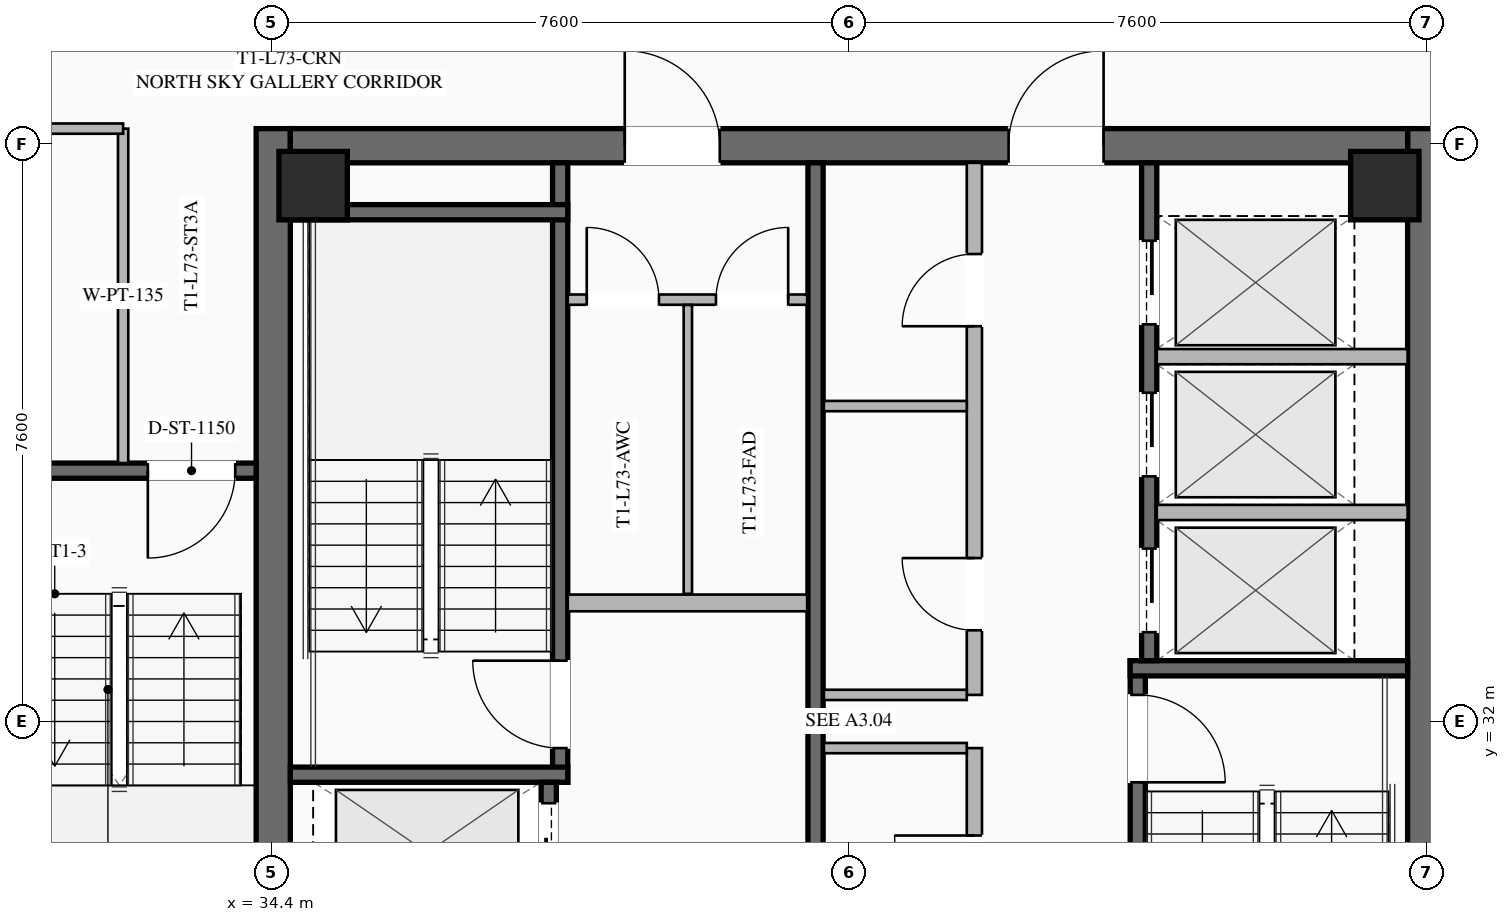
"""IFC4 building model, lengths in metres.
Left out: names, types, materials, properties, quantities, classifications, styles, units other than length and angle.
Written with IfcOpenShell. Run it as: python <this file> out.ifc"""

import sys

from ifc_helpers import new_model, si_unit, direction, frame, frame_2d, origin, origin_2d, place, context, subcontext, project, spatial, rectangle, hollow_rectangle, extrude, element, fill, save


model = new_model("IFC4")
c1 = context("Model", 3, precision=1e-05, world=origin(), true_north=direction((0.0, 1.0)))
c2 = subcontext(c1, "Body", "Model", "MODEL_VIEW")
j1 = project(units=[si_unit("LENGTHUNIT", "METRE"), si_unit("PLANEANGLEUNIT", "RADIAN")], contexts=[c1])
p1 = place(None, origin())
s1 = spatial("IfcSite", under=j1, at=p1, CompositionType="ELEMENT")
p2 = place(p1, origin())
s2 = spatial("IfcBuilding", under=s1, at=p2, CompositionType="ELEMENT")
p3 = place(p2, frame((0.0, 0.0, 270.5)))
s3 = spatial("IfcBuildingStorey", under=s2, at=p3, CompositionType="ELEMENT", Elevation=270.5)
for number, where, z_axis, x_axis in (
    (1, (34.425, 24.2, 0.0), (0.0, 0.0, 1.0), (0.0, 1.0, 0.0)),
    (2, (49.575, 39.8, 0.0), (0.0, 0.0, 1.0), (0.0, -1.0, 0.0)),
):
    element("IfcWall", number, at=place(p3, frame(where, z_axis=z_axis, x_axis=x_axis)), inside=s3, PredefinedType="SHEAR", context=c2, shape_type="SweptSolid", body=[
        extrude(rectangle(XDim=15.6, YDim=0.45, at=frame_2d((7.8, 0.0))), origin(), (0.0, 0.0, 1.0), 3.55),
    ])
p4 = place(p3, frame((34.65, 39.575, 0.0), z_axis=(0.0, 0.0, 1.0), x_axis=(1.0, 0.0, 0.0)))
e3 = element("IfcWall", 3, at=p4, inside=s3, PredefinedType="SHEAR", context=c2, shape_type="SweptSolid", body=[
    extrude(rectangle(XDim=14.7, YDim=0.45, at=frame_2d((7.35, 0.0))), origin(), (0.0, 0.0, 1.0), 3.55),
])
p5 = place(p4, frame((4.4, 0.0, 0.0)))
e4 = element("IfcOpeningElement", 4, at=p5, cuts=e3, PredefinedType="OPENING", context=c2, shape_type="SweptSolid", body=[
    extrude(rectangle(XDim=1.25, YDim=2.25, at=frame_2d((0.625, 1.125))), frame((0.0, 0.235, 0.0), z_axis=(0.0, -1.0, 0.0), x_axis=(1.0, 0.0, 0.0)), (0.0, 0.0, 1.0), 0.47),
])
p6 = place(p4, frame((9.45, 0.0, 0.0)))
e5 = element("IfcOpeningElement", 5, at=p6, cuts=e3, PredefinedType="OPENING", context=c2, shape_type="SweptSolid", body=[
    extrude(rectangle(XDim=1.25, YDim=2.25, at=frame_2d((0.625, 1.125))), frame((0.0, 0.235, 0.0), z_axis=(0.0, -1.0, 0.0), x_axis=(1.0, 0.0, 0.0)), (0.0, 0.0, 1.0), 0.47),
])
for number, where, z_axis, x_axis in (
    (6, (49.05, 39.05, 0.0), (0.0, 0.0, 1.0), (1.0, 0.0, 0.0)),
    (7, (34.95, 39.05, 0.0), (0.0, 0.0, 1.0), (1.0, 0.0, 0.0)),
):
    element("IfcColumn", number, at=place(p3, frame(where, z_axis=z_axis, x_axis=x_axis)), inside=s3, PredefinedType="COLUMN", context=c2, shape_type="SweptSolid", body=[
        extrude(hollow_rectangle(XDim=0.9, YDim=0.9, WallThickness=0.04, at=origin_2d()), origin(), (0.0, 0.0, 1.0), 3.37),
    ])
p7 = place(p3, frame((38.2, 31.2, 0.0), z_axis=(0.0, 0.0, 1.0), x_axis=(0.0, 1.0, 0.0)))
e8 = element("IfcWall", 8, at=p7, inside=s3, PredefinedType="SHEAR", context=c2, shape_type="SweptSolid", body=[
    extrude(rectangle(XDim=8.15, YDim=0.2, at=frame_2d((4.075, 0.0))), origin(), (0.0, 0.0, 1.0), 3.37),
])
p8 = place(p7, frame((0.45, 0.0, 0.0)))
e9 = element("IfcOpeningElement", 9, at=p8, cuts=e8, PredefinedType="OPENING", context=c2, shape_type="SweptSolid", body=[
    extrude(rectangle(XDim=1.15, YDim=2.2, at=frame_2d((0.575, 1.1))), frame((0.0, 0.11, 0.0), z_axis=(0.0, -1.0, 0.0), x_axis=(1.0, 0.0, 0.0)), (0.0, 0.0, 1.0), 0.22),
])
for number, where, z_axis, x_axis in (
    (10, (34.65, 31.3, 0.0), (0.0, 0.0, 1.0), (1.0, 0.0, 0.0)),
    (11, (34.65, 38.7, 0.0), (0.0, 0.0, 1.0), (1.0, 0.0, 0.0)),
):
    element("IfcWall", number, at=place(p3, frame(where, z_axis=z_axis, x_axis=x_axis)), inside=s3, PredefinedType="SHEAR", context=c2, shape_type="SweptSolid", body=[
        extrude(rectangle(XDim=3.65, YDim=0.2, at=frame_2d((1.825, 0.0))), origin(), (0.0, 0.0, 1.0), 3.37),
    ])
p9 = place(p3, frame((45.8, 32.8, 0.0), z_axis=(0.0, 0.0, 1.0), x_axis=(0.0, -1.0, 0.0)))
e12 = element("IfcWall", 12, at=p9, inside=s3, PredefinedType="SHEAR", context=c2, shape_type="SweptSolid", body=[
    extrude(rectangle(XDim=8.15, YDim=0.2, at=frame_2d((4.075, 0.0))), origin(), (0.0, 0.0, 1.0), 3.37),
])
p10 = place(p9, frame((0.45, 0.0, 0.0)))
e13 = element("IfcOpeningElement", 13, at=p10, cuts=e12, PredefinedType="OPENING", context=c2, shape_type="SweptSolid", body=[
    extrude(rectangle(XDim=1.15, YDim=2.2, at=frame_2d((0.575, 1.1))), frame((0.0, 0.11, 0.0), z_axis=(0.0, -1.0, 0.0), x_axis=(1.0, 0.0, 0.0)), (0.0, 0.0, 1.0), 0.22),
])
p11 = place(p3, frame((45.7, 32.7, 0.0), z_axis=(0.0, 0.0, 1.0), x_axis=(1.0, 0.0, 0.0)))
e14 = element("IfcWall", 14, at=p11, inside=s3, PredefinedType="SHEAR", context=c2, shape_type="SweptSolid", body=[
    extrude(rectangle(XDim=3.65, YDim=0.2, at=frame_2d((1.825, 0.0))), origin(), (0.0, 0.0, 1.0), 3.37),
])
p12 = place(p3, frame((41.56, 24.65, 0.0), z_axis=(0.0, 0.0, 1.0), x_axis=(0.0, 1.0, 0.0)))
e15 = element("IfcWall", 15, at=p12, inside=s3, PredefinedType="SHEAR", context=c2, shape_type="SweptSolid", body=[
    extrude(rectangle(XDim=14.7, YDim=0.2, at=frame_2d((7.35, 0.0))), origin(), (0.0, 0.0, 1.0), 3.37),
])
p13 = place(p3, frame((38.3, 33.56, 0.0), z_axis=(0.0, 0.0, 1.0), x_axis=(1.0, 0.0, 0.0)))
e16 = element("IfcWall", 16, at=p13, inside=s3, PredefinedType="SOLIDWALL", context=c2, shape_type="SweptSolid", body=[
    extrude(rectangle(XDim=3.15, YDim=0.22, at=frame_2d((1.575, 0.0))), origin(), (0.0, 0.0, 1.0), 2.723),
])
p14 = place(p3, frame((38.05, 24.65, 0.0), z_axis=(0.0, 0.0, 1.0), x_axis=(0.0, 1.0, 0.0)))
e17 = element("IfcWall", 17, at=p14, inside=s3, PredefinedType="SHEAR", context=c2, shape_type="SweptSolid", body=[
    extrude(rectangle(XDim=6.55, YDim=0.2, at=frame_2d((3.275, 0.0))), origin(), (0.0, 0.0, 1.0), 3.37),
])
p15 = place(p14, frame((4.975, 0.0, 0.0)))
e18 = element("IfcOpeningElement", 18, at=p15, cuts=e17, PredefinedType="OPENING", context=c2, shape_type="SweptSolid", body=[
    extrude(rectangle(XDim=1.3, YDim=2.25, at=frame_2d((0.65, 1.125))), frame((0.0, 0.11, 0.0), z_axis=(0.0, -1.0, 0.0), x_axis=(1.0, 0.0, 0.0)), (0.0, 0.0, 1.0), 0.22),
])
p16 = place(p14, frame((2.975, 0.0, 0.0)))
e19 = element("IfcOpeningElement", 19, at=p16, cuts=e17, PredefinedType="OPENING", context=c2, shape_type="SweptSolid", body=[
    extrude(rectangle(XDim=1.3, YDim=2.25, at=frame_2d((0.65, 1.125))), frame((0.0, 0.11, 0.0), z_axis=(0.0, -1.0, 0.0), x_axis=(1.0, 0.0, 0.0)), (0.0, 0.0, 1.0), 0.22),
])
p17 = place(p14, frame((0.775, 0.0, 0.0)))
e20 = element("IfcOpeningElement", 20, at=p17, cuts=e17, PredefinedType="OPENING", context=c2, shape_type="SweptSolid", body=[
    extrude(rectangle(XDim=1.3, YDim=2.25, at=frame_2d((0.65, 1.125))), frame((0.0, 0.11, 0.0), z_axis=(0.0, -1.0, 0.0), x_axis=(1.0, 0.0, 0.0)), (0.0, 0.0, 1.0), 0.22),
])
p18 = place(p3, frame((45.95, 39.35, 0.0), z_axis=(0.0, 0.0, 1.0), x_axis=(0.0, -1.0, 0.0)))
e21 = element("IfcWall", 21, at=p18, inside=s3, PredefinedType="SHEAR", context=c2, shape_type="SweptSolid", body=[
    extrude(rectangle(XDim=6.55, YDim=0.2, at=frame_2d((3.275, 0.0))), origin(), (0.0, 0.0, 1.0), 3.37),
])
p19 = place(p18, frame((5.075, 0.0, 0.0)))
e22 = element("IfcOpeningElement", 22, at=p19, cuts=e21, PredefinedType="OPENING", context=c2, shape_type="SweptSolid", body=[
    extrude(rectangle(XDim=1.1, YDim=2.2, at=frame_2d((0.55, 1.1))), frame((0.0, 0.11, 0.0), z_axis=(0.0, -1.0, 0.0), x_axis=(1.0, 0.0, 0.0)), (0.0, 0.0, 1.0), 0.22),
])
p20 = place(p18, frame((3.025, 0.0, 0.0)))
e23 = element("IfcOpeningElement", 23, at=p20, cuts=e21, PredefinedType="OPENING", context=c2, shape_type="SweptSolid", body=[
    extrude(rectangle(XDim=1.1, YDim=2.2, at=frame_2d((0.55, 1.1))), frame((0.0, 0.11, 0.0), z_axis=(0.0, -1.0, 0.0), x_axis=(1.0, 0.0, 0.0)), (0.0, 0.0, 1.0), 0.22),
])
p21 = place(p18, frame((1.025, 0.0, 0.0)))
e24 = element("IfcOpeningElement", 24, at=p21, cuts=e21, PredefinedType="OPENING", context=c2, shape_type="SweptSolid", body=[
    extrude(rectangle(XDim=1.1, YDim=2.2, at=frame_2d((0.55, 1.1))), frame((0.0, 0.11, 0.0), z_axis=(0.0, -1.0, 0.0), x_axis=(1.0, 0.0, 0.0)), (0.0, 0.0, 1.0), 0.22),
])
for number, where, z_axis, x_axis in (
    (25, (46.05, 34.75, 0.0), (0.0, 0.0, 1.0), (1.0, 0.0, 0.0)),
    (26, (46.05, 36.8, 0.0), (0.0, 0.0, 1.0), (1.0, 0.0, 0.0)),
):
    element("IfcWall", number, at=place(p3, frame(where, z_axis=z_axis, x_axis=x_axis)), inside=s3, PredefinedType="SOLIDWALL", context=c2, shape_type="SweptSolid", body=[
        extrude(rectangle(XDim=3.3, YDim=0.2, at=frame_2d((1.65, 0.0))), origin(), (0.0, 0.0, 1.0), 3.37),
    ])
p22 = place(p3, frame((38.3, 37.55, 0.0), z_axis=(0.0, 0.0, 1.0), x_axis=(1.0, 0.0, 0.0)))
e27 = element("IfcWall", 27, at=p22, inside=s3, PredefinedType="PARTITIONING", context=c2, shape_type="SweptSolid", body=[
    extrude(rectangle(XDim=3.15, YDim=0.135, at=frame_2d((1.575, 0.0))), origin(), (0.0, 0.0, 1.0), 2.723),
])
p23 = place(p22, frame((0.25, 0.0, 0.0)))
e28 = element("IfcOpeningElement", 28, at=p23, cuts=e27, PredefinedType="OPENING", context=c2, shape_type="SweptSolid", body=[
    extrude(rectangle(XDim=0.95, YDim=2.05, at=frame_2d((0.475, 1.025))), frame((0.0, 0.077, 0.0), z_axis=(0.0, -1.0, 0.0), x_axis=(1.0, 0.0, 0.0)), (0.0, 0.0, 1.0), 0.155),
])
p24 = place(p22, frame((1.95, 0.0, 0.0)))
e29 = element("IfcOpeningElement", 29, at=p24, cuts=e27, PredefinedType="OPENING", context=c2, shape_type="SweptSolid", body=[
    extrude(rectangle(XDim=0.95, YDim=2.05, at=frame_2d((0.475, 1.025))), frame((0.0, 0.077, 0.0), z_axis=(0.0, -1.0, 0.0), x_axis=(1.0, 0.0, 0.0)), (0.0, 0.0, 1.0), 0.155),
])
p25 = place(p3, frame((39.88, 33.68, 0.0), z_axis=(0.0, 0.0, 1.0), x_axis=(0.0, 1.0, 0.0)))
e30 = element("IfcWall", 30, at=p25, inside=s3, PredefinedType="PARTITIONING", context=c2, shape_type="SweptSolid", body=[
    extrude(rectangle(XDim=3.8, YDim=0.11, at=frame_2d((1.9, 0.0))), origin(), (0.0, 0.0, 1.0), 2.723),
])
p26 = place(p3, frame((43.65, 24.65, 0.0), z_axis=(0.0, 0.0, 1.0), x_axis=(0.0, 1.0, 0.0)))
e31 = element("IfcWall", 31, at=p26, inside=s3, PredefinedType="SOLIDWALL", context=c2, shape_type="SweptSolid", body=[
    extrude(rectangle(XDim=7.0, YDim=0.2, at=frame_2d((3.5, 0.0))), origin(), (0.0, 0.0, 1.0), 2.723),
])
p27 = place(p26, frame((0.85, 0.0, 0.0)))
e32 = element("IfcOpeningElement", 32, at=p27, cuts=e31, PredefinedType="OPENING", context=c2, shape_type="SweptSolid", body=[
    extrude(rectangle(XDim=0.95, YDim=2.05, at=frame_2d((0.475, 1.025))), frame((0.0, 0.11, 0.0), z_axis=(0.0, -1.0, 0.0), x_axis=(1.0, 0.0, 0.0)), (0.0, 0.0, 1.0), 0.22),
])
p28 = place(p26, frame((4.8, 0.0, 0.0)))
e33 = element("IfcOpeningElement", 33, at=p28, cuts=e31, PredefinedType="OPENING", context=c2, shape_type="SweptSolid", body=[
    extrude(rectangle(XDim=1.05, YDim=2.2, at=frame_2d((0.525, 1.1))), frame((0.0, 0.11, 0.0), z_axis=(0.0, -1.0, 0.0), x_axis=(1.0, 0.0, 0.0)), (0.0, 0.0, 1.0), 0.22),
])
p29 = place(p3, frame((41.67, 31.65, 0.0), z_axis=(0.0, 0.0, 1.0), x_axis=(1.0, 0.0, 0.0)))
e34 = element("IfcWall", 34, at=p29, inside=s3, PredefinedType="PARTITIONING", context=c2, shape_type="SweptSolid", body=[
    extrude(rectangle(XDim=1.88, YDim=0.135, at=frame_2d((0.94, 0.0))), origin(), (0.0, 0.0, 1.0), 2.723),
])
p30 = place(p3, frame((43.65, 32.35, 0.0), z_axis=(0.0, 0.0, 1.0), x_axis=(0.0, 1.0, 0.0)))
e35 = element("IfcWall", 35, at=p30, inside=s3, PredefinedType="SOLIDWALL", context=c2, shape_type="SweptSolid", body=[
    extrude(rectangle(XDim=7.0, YDim=0.2, at=frame_2d((3.5, 0.0))), origin(), (0.0, 0.0, 1.0), 2.723),
])
p31 = place(p30, frame((0.85, 0.0, 0.0)))
e36 = element("IfcOpeningElement", 36, at=p31, cuts=e35, PredefinedType="OPENING", context=c2, shape_type="SweptSolid", body=[
    extrude(rectangle(XDim=0.95, YDim=2.05, at=frame_2d((0.475, 1.025))), frame((0.0, 0.11, 0.0), z_axis=(0.0, -1.0, 0.0), x_axis=(1.0, 0.0, 0.0)), (0.0, 0.0, 1.0), 0.22),
])
p32 = place(p30, frame((4.85, 0.0, 0.0)))
e37 = element("IfcOpeningElement", 37, at=p32, cuts=e35, PredefinedType="OPENING", context=c2, shape_type="SweptSolid", body=[
    extrude(rectangle(XDim=0.95, YDim=2.05, at=frame_2d((0.475, 1.025))), frame((0.0, 0.11, 0.0), z_axis=(0.0, -1.0, 0.0), x_axis=(1.0, 0.0, 0.0)), (0.0, 0.0, 1.0), 0.22),
])
for number, where, z_axis, x_axis in (
    (38, (41.67, 32.35, 0.0), (0.0, 0.0, 1.0), (1.0, 0.0, 0.0)),
    (39, (41.67, 36.15, 0.0), (0.0, 0.0, 1.0), (1.0, 0.0, 0.0)),
):
    element("IfcWall", number, at=place(p3, frame(where, z_axis=z_axis, x_axis=x_axis)), inside=s3, PredefinedType="PARTITIONING", context=c2, shape_type="SweptSolid", body=[
        extrude(rectangle(XDim=1.88, YDim=0.135, at=frame_2d((0.94, 0.0))), origin(), (0.0, 0.0, 1.0), 2.723),
    ])
p33 = place(p3, frame((34.2, 35.3, 0.0), z_axis=(0.0, 0.0, 1.0), x_axis=(-1.0, 0.0, 0.0)))
e40 = element("IfcWall", 40, at=p33, inside=s3, PredefinedType="SHEAR", context=c2, shape_type="SweptSolid", body=[
    extrude(rectangle(XDim=3.4, YDim=0.2, at=frame_2d((1.7, 0.0))), origin(), (0.0, 0.0, 1.0), 3.37),
])
p34 = place(p33, frame((0.275, 0.0, 0.0)))
e41 = element("IfcOpeningElement", 41, at=p34, cuts=e40, PredefinedType="OPENING", context=c2, shape_type="SweptSolid", body=[
    extrude(rectangle(XDim=1.15, YDim=2.2, at=frame_2d((0.575, 1.1))), frame((0.0, 0.11, 0.0), z_axis=(0.0, -1.0, 0.0), x_axis=(1.0, 0.0, 0.0)), (0.0, 0.0, 1.0), 0.22),
])
p35 = place(p3, frame((32.45, 35.4, 0.0), z_axis=(0.0, 0.0, 1.0), x_axis=(0.0, 1.0, 0.0)))
e42 = element("IfcWall", 42, at=p35, inside=s3, PredefinedType="PARTITIONING", context=c2, shape_type="SweptSolid", body=[
    extrude(rectangle(XDim=4.4, YDim=0.135, at=frame_2d((2.2, 0.0))), origin(), (0.0, 0.0, 1.0), 2.723),
])
p36 = place(p3, frame((32.45, 39.8, 0.0), z_axis=(0.0, 0.0, 1.0), x_axis=(-1.0, 0.0, 0.0)))
e43 = element("IfcWall", 43, at=p36, inside=s3, PredefinedType="PARTITIONING", context=c2, shape_type="SweptSolid", body=[
    extrude(rectangle(XDim=5.63, YDim=0.135, at=frame_2d((2.815, 0.0))), origin(), (0.0, 0.0, 1.0), 2.723),
])
p37 = place(p36, frame((2.025, 0.0, 0.0)))
e44 = element("IfcOpeningElement", 44, at=p37, cuts=e43, PredefinedType="OPENING", context=c2, shape_type="SweptSolid", body=[
    extrude(rectangle(XDim=0.95, YDim=2.05, at=frame_2d((0.475, 1.025))), frame((0.0, 0.077, 0.0), z_axis=(0.0, -1.0, 0.0), x_axis=(1.0, 0.0, 0.0)), (0.0, 0.0, 1.0), 0.155),
])
p38 = place(p5, origin())
e45 = element("IfcDoor", 45, at=p38, inside=s3, OperationType="SINGLE_SWING_LEFT", PredefinedType="DOOR", context=c2, shape_type="SweptSolid", body=[
    extrude(rectangle(XDim=1.25, YDim=2.25, at=frame_2d((0.625, 1.125))), frame((0.0, 0.025, 0.0), z_axis=(0.0, -1.0, 0.0), x_axis=(1.0, 0.0, 0.0)), (0.0, 0.0, 1.0), 0.05),
])
fill(e4, e45)
p39 = place(p6, origin())
e46 = element("IfcDoor", 46, at=p39, inside=s3, OperationType="SINGLE_SWING_RIGHT", PredefinedType="DOOR", context=c2, shape_type="SweptSolid", body=[
    extrude(rectangle(XDim=1.25, YDim=2.25, at=frame_2d((0.625, 1.125))), frame((0.0, 0.025, 0.0), z_axis=(0.0, -1.0, 0.0), x_axis=(1.0, 0.0, 0.0)), (0.0, 0.0, 1.0), 0.05),
])
fill(e5, e46)
p40 = place(p8, origin())
e47 = element("IfcDoor", 47, at=p40, inside=s3, OperationType="SINGLE_SWING_RIGHT", PredefinedType="DOOR", context=c2, shape_type="SweptSolid", body=[
    extrude(rectangle(XDim=1.15, YDim=2.2, at=frame_2d((0.575, 1.1))), frame((0.0, 0.025, 0.0), z_axis=(0.0, -1.0, 0.0), x_axis=(1.0, 0.0, 0.0)), (0.0, 0.0, 1.0), 0.05),
])
fill(e9, e47)
p41 = place(p10, origin())
e48 = element("IfcDoor", 48, at=p41, inside=s3, OperationType="SINGLE_SWING_RIGHT", PredefinedType="DOOR", context=c2, shape_type="SweptSolid", body=[
    extrude(rectangle(XDim=1.15, YDim=2.2, at=frame_2d((0.575, 1.1))), frame((0.0, 0.025, 0.0), z_axis=(0.0, -1.0, 0.0), x_axis=(1.0, 0.0, 0.0)), (0.0, 0.0, 1.0), 0.05),
])
fill(e13, e48)
p42 = place(p23, origin())
e49 = element("IfcDoor", 49, at=p42, inside=s3, OperationType="SINGLE_SWING_LEFT", PredefinedType="DOOR", context=c2, shape_type="SweptSolid", body=[
    extrude(rectangle(XDim=0.95, YDim=2.05, at=frame_2d((0.475, 1.025))), frame((0.0, 0.025, 0.0), z_axis=(0.0, -1.0, 0.0), x_axis=(1.0, 0.0, 0.0)), (0.0, 0.0, 1.0), 0.05),
])
fill(e28, e49)
p43 = place(p24, origin())
e50 = element("IfcDoor", 50, at=p43, inside=s3, OperationType="SINGLE_SWING_RIGHT", PredefinedType="DOOR", context=c2, shape_type="SweptSolid", body=[
    extrude(rectangle(XDim=0.95, YDim=2.05, at=frame_2d((0.475, 1.025))), frame((0.0, 0.025, 0.0), z_axis=(0.0, -1.0, 0.0), x_axis=(1.0, 0.0, 0.0)), (0.0, 0.0, 1.0), 0.05),
])
fill(e29, e50)
p44 = place(p28, origin())
e51 = element("IfcDoor", 51, at=p44, inside=s3, OperationType="SINGLE_SWING_RIGHT", PredefinedType="DOOR", context=c2, shape_type="SweptSolid", body=[
    extrude(rectangle(XDim=1.05, YDim=2.2, at=frame_2d((0.525, 1.1))), frame((0.0, 0.025, 0.0), z_axis=(0.0, -1.0, 0.0), x_axis=(1.0, 0.0, 0.0)), (0.0, 0.0, 1.0), 0.05),
])
fill(e33, e51)
p45 = place(p31, origin())
e52 = element("IfcDoor", 52, at=p45, inside=s3, OperationType="SINGLE_SWING_RIGHT", PredefinedType="DOOR", context=c2, shape_type="SweptSolid", body=[
    extrude(rectangle(XDim=0.95, YDim=2.05, at=frame_2d((0.475, 1.025))), frame((0.0, 0.025, 0.0), z_axis=(0.0, -1.0, 0.0), x_axis=(1.0, 0.0, 0.0)), (0.0, 0.0, 1.0), 0.05),
])
fill(e36, e52)
p46 = place(p32, origin())
e53 = element("IfcDoor", 53, at=p46, inside=s3, OperationType="SINGLE_SWING_LEFT", PredefinedType="DOOR", context=c2, shape_type="SweptSolid", body=[
    extrude(rectangle(XDim=0.95, YDim=2.05, at=frame_2d((0.475, 1.025))), frame((0.0, 0.025, 0.0), z_axis=(0.0, -1.0, 0.0), x_axis=(1.0, 0.0, 0.0)), (0.0, 0.0, 1.0), 0.05),
])
fill(e37, e53)
p47 = place(p34, origin())
e54 = element("IfcDoor", 54, at=p47, inside=s3, OperationType="SINGLE_SWING_RIGHT", PredefinedType="DOOR", context=c2, shape_type="SweptSolid", body=[
    extrude(rectangle(XDim=1.15, YDim=2.2, at=frame_2d((0.575, 1.1))), frame((0.0, 0.025, 0.0), z_axis=(0.0, -1.0, 0.0), x_axis=(1.0, 0.0, 0.0)), (0.0, 0.0, 1.0), 0.05),
])
fill(e41, e54)
p48 = place(p15, origin())
e55 = element("IfcDoor", 55, at=p48, inside=s3, OperationType="SLIDING_TO_LEFT", PredefinedType="DOOR", context=c2, shape_type="SweptSolid", body=[
    extrude(rectangle(XDim=1.3, YDim=2.25, at=frame_2d((0.65, 1.125))), frame((0.0, 0.025, 0.0), z_axis=(0.0, -1.0, 0.0), x_axis=(1.0, 0.0, 0.0)), (0.0, 0.0, 1.0), 0.05),
])
fill(e18, e55)
p49 = place(p19, origin())
e56 = element("IfcDoor", 56, at=p49, inside=s3, OperationType="SLIDING_TO_LEFT", PredefinedType="DOOR", context=c2, shape_type="SweptSolid", body=[
    extrude(rectangle(XDim=1.1, YDim=2.2, at=frame_2d((0.55, 1.1))), frame((0.0, 0.025, 0.0), z_axis=(0.0, -1.0, 0.0), x_axis=(1.0, 0.0, 0.0)), (0.0, 0.0, 1.0), 0.05),
])
fill(e22, e56)
p50 = place(p20, origin())
e57 = element("IfcDoor", 57, at=p50, inside=s3, OperationType="SLIDING_TO_LEFT", PredefinedType="DOOR", context=c2, shape_type="SweptSolid", body=[
    extrude(rectangle(XDim=1.1, YDim=2.2, at=frame_2d((0.55, 1.1))), frame((0.0, 0.025, 0.0), z_axis=(0.0, -1.0, 0.0), x_axis=(1.0, 0.0, 0.0)), (0.0, 0.0, 1.0), 0.05),
])
fill(e23, e57)
p51 = place(p21, origin())
e58 = element("IfcDoor", 58, at=p51, inside=s3, OperationType="SLIDING_TO_LEFT", PredefinedType="DOOR", context=c2, shape_type="SweptSolid", body=[
    extrude(rectangle(XDim=1.1, YDim=2.2, at=frame_2d((0.55, 1.1))), frame((0.0, 0.025, 0.0), z_axis=(0.0, -1.0, 0.0), x_axis=(1.0, 0.0, 0.0)), (0.0, 0.0, 1.0), 0.05),
])
fill(e24, e58)
save(model, sys.argv[1])
